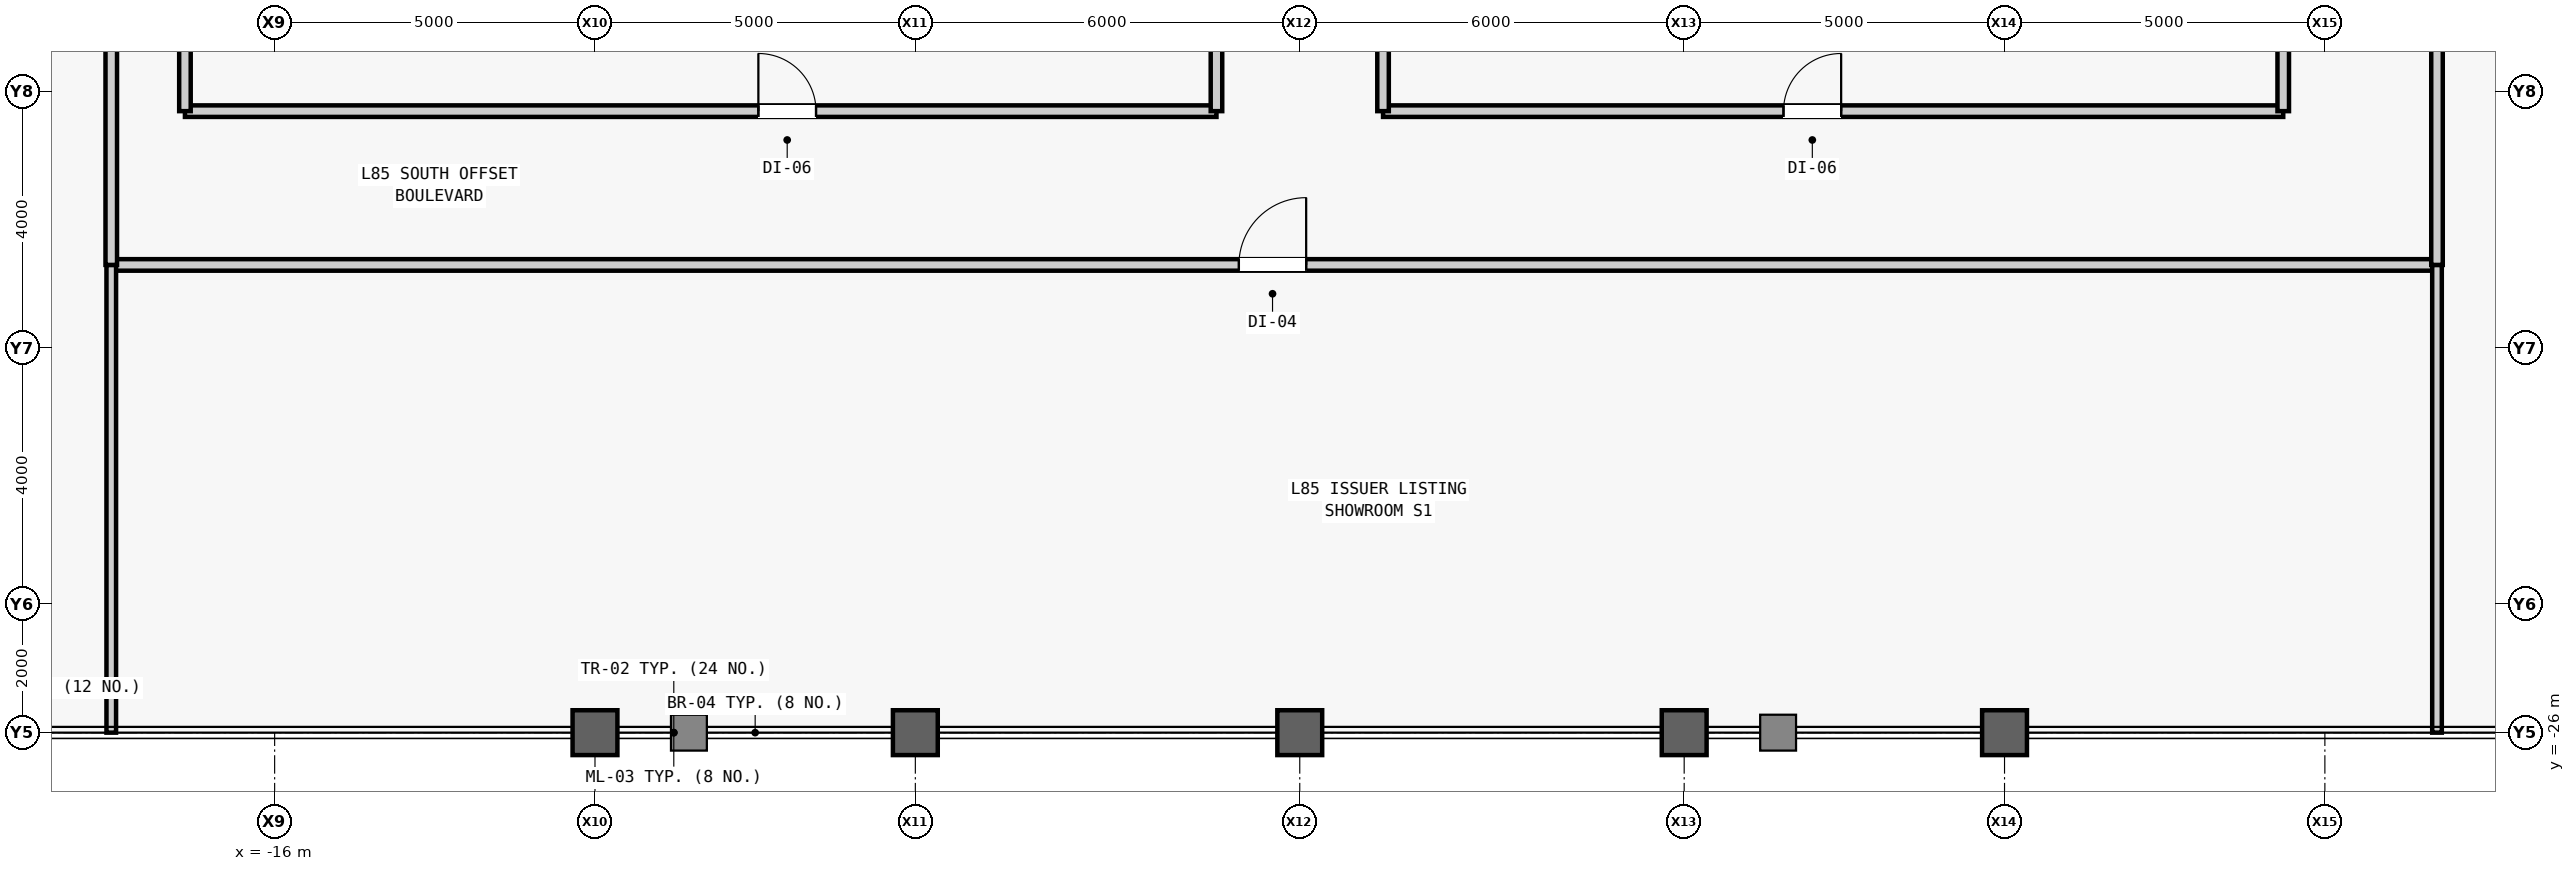
"""IFC4 building model, lengths in metres.
Left out: names, types, materials, properties, quantities, classifications, styles, units other than length and angle.
Written with IfcOpenShell. Run it as: python <this file> out.ifc"""

import sys

from ifc_helpers import new_model, si_unit, direction, frame, frame_2d, origin, origin_2d, place, context, subcontext, project, spatial, rectangle, hollow_rectangle, extrude, source, transform, mapped, element, fill, save


model = new_model("IFC4")
c1 = context("Model", 3, precision=1e-05, world=origin(), true_north=direction((0.0, 1.0)))
c2 = subcontext(c1, "Body", "Model", "MODEL_VIEW")
j1 = project(units=[si_unit("LENGTHUNIT", "METRE"), si_unit("PLANEANGLEUNIT", "RADIAN")], contexts=[c1])
p1 = place(None, origin())
s1 = spatial("IfcSite", under=j1, at=p1, CompositionType="ELEMENT")
p2 = place(p1, origin())
s2 = spatial("IfcBuilding", under=s1, at=p2, CompositionType="ELEMENT")
p3 = place(p2, frame((0.0, 0.0, 358.3)))
s3 = spatial("IfcBuildingStorey", under=s2, at=p3, CompositionType="ELEMENT", Elevation=358.3)
m1 = source(origin(), c2, "Body", "SweptSolid", [
    extrude(hollow_rectangle(XDim=0.7, YDim=0.7, WallThickness=0.04, at=origin_2d()), origin(), (0.0, 0.0, 1.0), 4.0),
])
for number, where, z_axis, x_axis in (
    (1, (-11.0, -26.0, 0.0), (0.0, 0.0, 1.0), (1.0, 0.0, 0.0)),
    (2, (-6.0, -26.0, 0.0), (0.0, 0.0, 1.0), (1.0, 0.0, 0.0)),
    (3, (0.0, -26.0, 0.0), (0.0, 0.0, 1.0), (1.0, 0.0, 0.0)),
    (4, (6.0, -26.0, 0.0), (0.0, 0.0, 1.0), (1.0, 0.0, 0.0)),
    (5, (11.0, -26.0, 0.0), (0.0, 0.0, 1.0), (1.0, 0.0, 0.0)),
):
    element("IfcColumn", number, at=place(p3, frame(where, z_axis=z_axis, x_axis=x_axis)), inside=s3, PredefinedType="COLUMN", context=c2, shape_type="MappedRepresentation", body=[
        mapped(m1, transform((0.0, 0.0, 0.0), scale=1.0)),
    ])
m2 = source(origin(), c2, "Body", "SweptSolid", [
    extrude(rectangle(XDim=16.1, YDim=0.18, at=frame_2d((8.05, 0.0))), origin(), (0.0, 0.0, 1.0), 3.74),
])
p4 = place(p3, frame((-17.4, -16.3, 0.0), z_axis=(0.0, 0.0, 1.0), x_axis=(1.0, 0.0, 0.0)))
e6 = element("IfcWall", 6, at=p4, inside=s3, PredefinedType="PARTITIONING", context=c2, shape_type="MappedRepresentation", body=[
    mapped(m2, transform((0.0, 0.0, 0.0), scale=1.0)),
])
m3 = source(origin(), c2, "Body", "SweptSolid", [
    extrude(rectangle(XDim=0.9, YDim=2.15, at=frame_2d((0.45, 1.075))), frame((0.0, 0.1, 0.0), z_axis=(0.0, -1.0, 0.0), x_axis=(1.0, 0.0, 0.0)), (0.0, 0.0, 1.0), 0.2),
])
p5 = place(p4, frame((8.95, 0.0, 0.0)))
e7 = element("IfcOpeningElement", 7, at=p5, cuts=e6, PredefinedType="OPENING", context=c2, shape_type="MappedRepresentation", body=[
    mapped(m3, transform((0.0, 0.0, 0.0), scale=1.0)),
])
m4 = source(origin(), c2, "Body", "SweptSolid", [
    extrude(rectangle(XDim=6.5, YDim=0.18, at=frame_2d((3.25, 0.0))), origin(), (0.0, 0.0, 1.0), 3.74),
])
p6 = place(p3, frame((-17.4, -16.3, 0.0), z_axis=(0.0, 0.0, 1.0), x_axis=(0.0, 1.0, 0.0)))
e8 = element("IfcWall", 8, at=p6, inside=s3, PredefinedType="PARTITIONING", context=c2, shape_type="MappedRepresentation", body=[
    mapped(m4, transform((0.0, 0.0, 0.0), scale=1.0)),
])
m5 = source(origin(), c2, "Body", "SweptSolid", [
    extrude(rectangle(XDim=5.3, YDim=0.18, at=frame_2d((2.65, 0.0))), origin(), (0.0, 0.0, 1.0), 3.74),
])
p7 = place(p3, frame((-1.3, -16.3, 0.0), z_axis=(0.0, 0.0, 1.0), x_axis=(0.0, 1.0, 0.0)))
e9 = element("IfcWall", 9, at=p7, inside=s3, PredefinedType="PARTITIONING", context=c2, shape_type="MappedRepresentation", body=[
    mapped(m5, transform((0.0, 0.0, 0.0), scale=1.0)),
])
m6 = source(origin(), c2, "Body", "SweptSolid", [
    extrude(rectangle(XDim=14.05, YDim=0.18, at=frame_2d((7.025, 0.0))), origin(), (0.0, 0.0, 1.0), 3.74),
])
p8 = place(p3, frame((1.3, -16.3, 0.0), z_axis=(0.0, 0.0, 1.0), x_axis=(1.0, 0.0, 0.0)))
e10 = element("IfcWall", 10, at=p8, inside=s3, PredefinedType="PARTITIONING", context=c2, shape_type="MappedRepresentation", body=[
    mapped(m6, transform((0.0, 0.0, 0.0), scale=1.0)),
])
p9 = place(p8, frame((6.25, 0.0, 0.0)))
e11 = element("IfcOpeningElement", 11, at=p9, cuts=e10, PredefinedType="OPENING", context=c2, shape_type="MappedRepresentation", body=[
    mapped(m3, transform((0.0, 0.0, 0.0), scale=1.0)),
])
p10 = place(p3, frame((1.3, -16.3, 0.0), z_axis=(0.0, 0.0, 1.0), x_axis=(0.0, 1.0, 0.0)))
e12 = element("IfcWall", 12, at=p10, inside=s3, PredefinedType="PARTITIONING", context=c2, shape_type="MappedRepresentation", body=[
    mapped(m5, transform((0.0, 0.0, 0.0), scale=1.0)),
])
m7 = source(origin(), c2, "Body", "SweptSolid", [
    extrude(rectangle(XDim=5.8, YDim=0.18, at=frame_2d((2.9, 0.0))), origin(), (0.0, 0.0, 1.0), 3.74),
])
p11 = place(p3, frame((15.35, -16.3, 0.0), z_axis=(0.0, 0.0, 1.0), x_axis=(0.0, 1.0, 0.0)))
e13 = element("IfcWall", 13, at=p11, inside=s3, PredefinedType="PARTITIONING", context=c2, shape_type="MappedRepresentation", body=[
    mapped(m7, transform((0.0, 0.0, 0.0), scale=1.0)),
])
m8 = source(origin(), c2, "Body", "SweptSolid", [
    extrude(rectangle(XDim=36.3, YDim=0.18, at=frame_2d((18.15, 0.0))), origin(), (0.0, 0.0, 1.0), 3.74),
])
p12 = place(p3, frame((-18.55, -18.7, 0.0), z_axis=(0.0, 0.0, 1.0), x_axis=(1.0, 0.0, 0.0)))
e14 = element("IfcWall", 14, at=p12, inside=s3, PredefinedType="PARTITIONING", context=c2, shape_type="MappedRepresentation", body=[
    mapped(m8, transform((0.0, 0.0, 0.0), scale=1.0)),
])
m9 = source(origin(), c2, "Body", "SweptSolid", [
    extrude(rectangle(XDim=1.05, YDim=2.2, at=frame_2d((0.525, 1.1))), frame((0.0, 0.1, 0.0), z_axis=(0.0, -1.0, 0.0), x_axis=(1.0, 0.0, 0.0)), (0.0, 0.0, 1.0), 0.2),
])
p13 = place(p12, frame((17.6, 0.0, 0.0)))
e15 = element("IfcOpeningElement", 15, at=p13, cuts=e14, PredefinedType="OPENING", context=c2, shape_type="MappedRepresentation", body=[
    mapped(m9, transform((0.0, 0.0, 0.0), scale=1.0)),
])
m10 = source(origin(), c2, "Body", "SweptSolid", [
    extrude(rectangle(XDim=7.3, YDim=0.15, at=frame_2d((3.65, 0.0))), origin(), (0.0, 0.0, 1.0), 3.74),
])
for number, where, z_axis, x_axis in (
    (16, (-18.55, -26.0, 0.0), (0.0, 0.0, 1.0), (0.0, 1.0, 0.0)),
    (17, (17.75, -26.0, 0.0), (0.0, 0.0, 1.0), (0.0, 1.0, 0.0)),
):
    element("IfcWall", number, at=place(p3, frame(where, z_axis=z_axis, x_axis=x_axis)), inside=s3, PredefinedType="PARTITIONING", context=c2, shape_type="MappedRepresentation", body=[
        mapped(m10, transform((0.0, 0.0, 0.0), scale=1.0)),
    ])
m11 = source(origin(), c2, "Body", "SweptSolid", [
    extrude(rectangle(XDim=38.7, YDim=0.18, at=frame_2d((19.35, 0.0))), origin(), (0.0, 0.0, 1.0), 3.74),
])
p14 = place(p3, frame((-18.55, -18.7, 0.0), z_axis=(0.0, 0.0, 1.0), x_axis=(0.0, 1.0, 0.0)))
e18 = element("IfcWall", 18, at=p14, inside=s3, PredefinedType="PARTITIONING", context=c2, shape_type="MappedRepresentation", body=[
    mapped(m11, transform((0.0, 0.0, 0.0), scale=1.0)),
])
m12 = source(origin(), c2, "Body", "SweptSolid", [
    extrude(rectangle(XDim=0.95, YDim=2.15, at=frame_2d((0.475, 1.075))), frame((0.0, 0.1, 0.0), z_axis=(0.0, -1.0, 0.0), x_axis=(1.0, 0.0, 0.0)), (0.0, 0.0, 1.0), 0.2),
])
p15 = place(p14, frame((9.243, 0.0, 0.0)))
e19 = element("IfcOpeningElement", 19, at=p15, cuts=e18, PredefinedType="OPENING", context=c2, shape_type="MappedRepresentation", body=[
    mapped(m12, transform((0.0, 0.0, 0.0), scale=1.0)),
])
p16 = place(p14, frame((24.593, 0.0, 0.0)))
e20 = element("IfcOpeningElement", 20, at=p16, cuts=e18, PredefinedType="OPENING", context=c2, shape_type="MappedRepresentation", body=[
    mapped(m12, transform((0.0, 0.0, 0.0), scale=1.0)),
])
p17 = place(p3, frame((17.75, -18.7, 0.0), z_axis=(0.0, 0.0, 1.0), x_axis=(0.0, 1.0, 0.0)))
e21 = element("IfcWall", 21, at=p17, inside=s3, PredefinedType="PARTITIONING", context=c2, shape_type="MappedRepresentation", body=[
    mapped(m11, transform((0.0, 0.0, 0.0), scale=1.0)),
])
p18 = place(p17, frame((7.607, 0.0, 0.0)))
e22 = element("IfcOpeningElement", 22, at=p18, cuts=e21, PredefinedType="OPENING", context=c2, shape_type="MappedRepresentation", body=[
    mapped(m12, transform((0.0, 0.0, 0.0), scale=1.0)),
])
p19 = place(p17, frame((17.772, 0.0, 0.0)))
e23 = element("IfcOpeningElement", 23, at=p19, cuts=e21, PredefinedType="OPENING", context=c2, shape_type="MappedRepresentation", body=[
    mapped(m12, transform((0.0, 0.0, 0.0), scale=1.0)),
])
p20 = place(p17, frame((27.04, 0.0, 0.0)))
e24 = element("IfcOpeningElement", 24, at=p20, cuts=e21, PredefinedType="OPENING", context=c2, shape_type="MappedRepresentation", body=[
    mapped(m12, transform((0.0, 0.0, 0.0), scale=1.0)),
])
m13 = source(origin(), c2, "Body", "SweptSolid", [
    extrude(rectangle(XDim=0.9, YDim=2.15, at=frame_2d((0.45, 1.075))), frame((0.0, 0.025, 0.0), z_axis=(0.0, -1.0, 0.0), x_axis=(1.0, 0.0, 0.0)), (0.0, 0.0, 1.0), 0.05),
])
p21 = place(p5, origin())
e25 = element("IfcDoor", 25, at=p21, inside=s3, OperationType="SINGLE_SWING_LEFT", PredefinedType="DOOR", context=c2, shape_type="MappedRepresentation", body=[
    mapped(m13, transform((0.0, 0.0, 0.0), scale=1.0)),
])
fill(e7, e25)
p22 = place(p9, origin())
e26 = element("IfcDoor", 26, at=p22, inside=s3, OperationType="SINGLE_SWING_RIGHT", PredefinedType="DOOR", context=c2, shape_type="MappedRepresentation", body=[
    mapped(m13, transform((0.0, 0.0, 0.0), scale=1.0)),
])
fill(e11, e26)
m14 = source(origin(), c2, "Body", "SweptSolid", [
    extrude(rectangle(XDim=1.05, YDim=2.2, at=frame_2d((0.525, 1.1))), frame((0.0, 0.025, 0.0), z_axis=(0.0, -1.0, 0.0), x_axis=(1.0, 0.0, 0.0)), (0.0, 0.0, 1.0), 0.05),
])
p23 = place(p13, origin())
e27 = element("IfcDoor", 27, at=p23, inside=s3, OperationType="SINGLE_SWING_RIGHT", PredefinedType="DOOR", context=c2, shape_type="MappedRepresentation", body=[
    mapped(m14, transform((0.0, 0.0, 0.0), scale=1.0)),
])
fill(e15, e27)
save(model, sys.argv[1])
